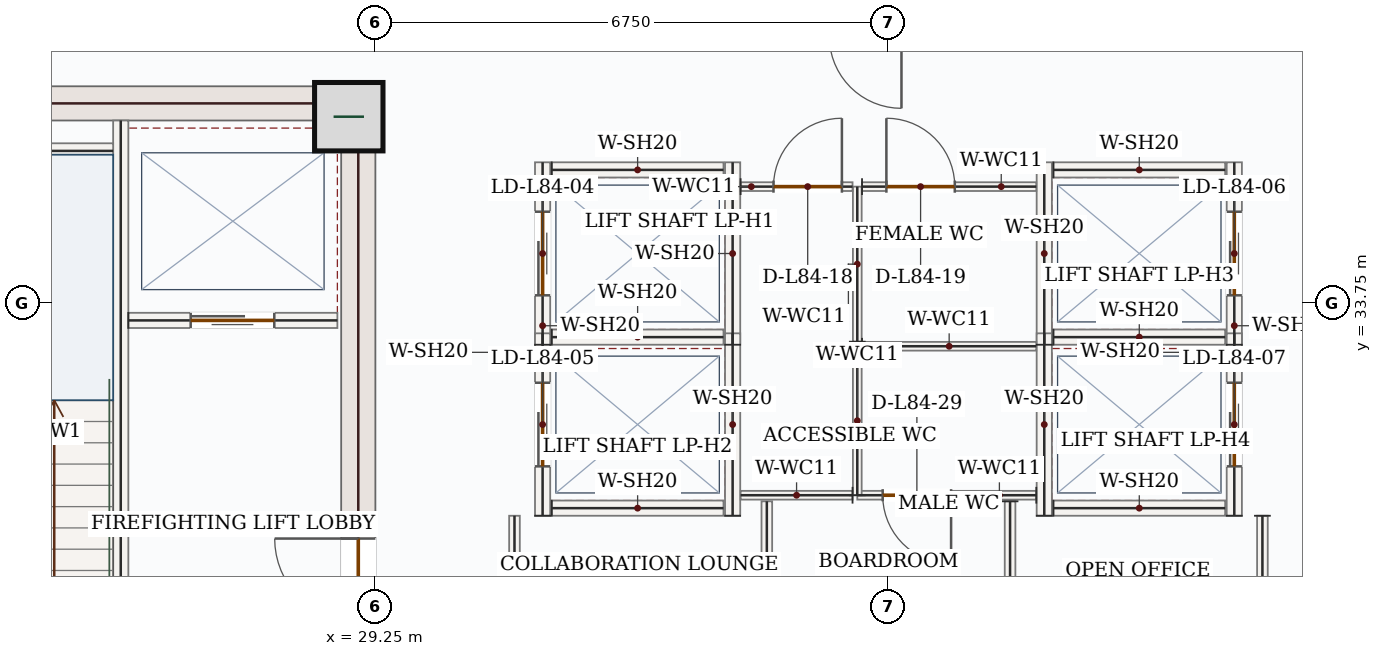
"""IFC4 building model, lengths in metres.
Left out: names, types, materials, properties, quantities, classifications, styles, units other than length and angle.
Written with IfcOpenShell. Run it as: python <this file> out.ifc"""

import sys

from ifc_helpers import new_model, si_unit, direction, frame, frame_2d, origin, origin_2d, place, context, subcontext, project, spatial, rectangle, extrude, source, transform, mapped, element, fill, save


model = new_model("IFC4")
c1 = context("Model", 3, precision=1e-05, world=origin(), true_north=direction((0.0, 1.0)))
c2 = subcontext(c1, "Body", "Model", "MODEL_VIEW")
j1 = project(units=[si_unit("LENGTHUNIT", "METRE"), si_unit("PLANEANGLEUNIT", "RADIAN")], contexts=[c1])
p1 = place(None, origin())
s1 = spatial("IfcSite", under=j1, at=p1, CompositionType="ELEMENT")
p2 = place(p1, origin())
s2 = spatial("IfcBuilding", under=s1, at=p2, CompositionType="ELEMENT")
p3 = place(p2, frame((0.0, 0.0, 346.05)))
s3 = spatial("IfcBuildingStorey", under=s2, at=p3, CompositionType="ELEMENT", Elevation=346.05)
p4 = place(p3, frame((29.025, 28.05, 0.0), z_axis=(0.0, 0.0, 1.0), x_axis=(0.0, 1.0, 0.0)))
e1 = element("IfcWall", 1, at=p4, inside=s3, PredefinedType="SHEAR", context=c2, shape_type="SweptSolid", body=[
    extrude(rectangle(XDim=8.55, YDim=0.45, at=frame_2d((4.275, 0.0))), origin(), (0.0, 0.0, 1.0), 3.5),
])
p5 = place(p4, frame((1.5, 0.0, 0.0)))
e2 = element("IfcOpeningElement", 2, at=p5, cuts=e1, PredefinedType="OPENING", context=c2, shape_type="SweptSolid", body=[
    extrude(rectangle(XDim=1.1, YDim=2.2, at=frame_2d((0.55, 1.1))), frame((0.0, 0.235, 0.0), z_axis=(0.0, -1.0, 0.0), x_axis=(1.0, 0.0, 0.0)), (0.0, 0.0, 1.0), 0.47),
])
m1 = source(origin(), c2, "Body", "SweptSolid", [
    extrude(rectangle(XDim=7.1, YDim=0.45, at=frame_2d((3.55, 0.0))), origin(), (0.0, 0.0, 1.0), 3.5),
])
p6 = place(p3, frame((21.7, 36.375, 0.0), z_axis=(0.0, 0.0, 1.0), x_axis=(1.0, 0.0, 0.0)))
e3 = element("IfcWall", 3, at=p6, inside=s3, PredefinedType="SHEAR", context=c2, shape_type="MappedRepresentation", body=[
    mapped(m1, transform((0.0, 0.0, 0.0), x_axis=(1.0, 0.0, 0.0), y_axis=(0.0, 1.0, 0.0), z_axis=(0.0, 0.0, 1.0), scale=1.0)),
])
m2 = source(origin(), c2, "Body", "SweptSolid", [
    extrude(rectangle(XDim=0.9, YDim=0.9, at=origin_2d()), origin(), (0.0, 0.0, 1.0), 3.75),
])
p7 = place(p3, frame((28.9, 36.2, 0.0), z_axis=(0.0, 0.0, 1.0), x_axis=(1.0, 0.0, 0.0)))
e4 = element("IfcColumn", 4, at=p7, inside=s3, PredefinedType="COLUMN", context=c2, shape_type="MappedRepresentation", body=[
    mapped(m2, transform((0.0, 0.0, 0.0), x_axis=(1.0, 0.0, 0.0), y_axis=(0.0, 1.0, 0.0), z_axis=(0.0, 0.0, 1.0), scale=1.0)),
])
p8 = place(p3, frame((25.9, 28.15, 0.0), z_axis=(0.0, 0.0, 1.0), x_axis=(0.0, 1.0, 0.0)))
e5 = element("IfcWall", 5, at=p8, inside=s3, PredefinedType="SOLIDWALL", context=c2, shape_type="SweptSolid", body=[
    extrude(rectangle(XDim=8.0, YDim=0.2, at=frame_2d((4.0, 0.0))), origin(), (0.0, 0.0, 1.0), 3.5),
])
p9 = place(p8, frame((0.4, 0.0, 0.0)))
e6 = element("IfcOpeningElement", 6, at=p9, cuts=e5, PredefinedType="OPENING", context=c2, shape_type="SweptSolid", body=[
    extrude(rectangle(XDim=1.05, YDim=2.15, at=frame_2d((0.525, 1.075))), frame((0.0, 0.11, 0.0), z_axis=(0.0, -1.0, 0.0), x_axis=(1.0, 0.0, 0.0)), (0.0, 0.0, 1.0), 0.22),
])
m3 = source(origin(), c2, "Body", "SweptSolid", [
    extrude(rectangle(XDim=3.25, YDim=0.2, at=frame_2d((1.625, 0.0))), origin(), (0.0, 0.0, 1.0), 3.5),
])
p10 = place(p3, frame((22.55, 35.75, 0.0), z_axis=(0.0, 0.0, 1.0), x_axis=(1.0, 0.0, 0.0)))
e7 = element("IfcWall", 7, at=p10, inside=s3, PredefinedType="SOLIDWALL", context=c2, shape_type="MappedRepresentation", body=[
    mapped(m3, transform((0.0, 0.0, 0.0), x_axis=(1.0, 0.0, 0.0), y_axis=(0.0, 1.0, 0.0), z_axis=(0.0, 0.0, 1.0), scale=1.0)),
])
p11 = place(p3, frame((26.0, 33.52, 0.0), z_axis=(0.0, 0.0, 1.0), x_axis=(1.0, 0.0, 0.0)))
e8 = element("IfcWall", 8, at=p11, inside=s3, PredefinedType="SOLIDWALL", context=c2, shape_type="SweptSolid", body=[
    extrude(rectangle(XDim=2.75, YDim=0.2, at=frame_2d((1.375, 0.0))), origin(), (0.0, 0.0, 1.0), 3.5),
])
p12 = place(p11, frame((0.82, 0.0, 0.0)))
e9 = element("IfcOpeningElement", 9, at=p12, cuts=e8, PredefinedType="OPENING", context=c2, shape_type="SweptSolid", body=[
    extrude(rectangle(XDim=1.1, YDim=2.15, at=frame_2d((0.55, 1.075))), frame((0.0, 0.11, 0.0), z_axis=(0.0, -1.0, 0.0), x_axis=(1.0, 0.0, 0.0)), (0.0, 0.0, 1.0), 0.22),
])
p13 = place(p3, frame((31.45, 33.2, 0.0), z_axis=(0.0, 0.0, 1.0), x_axis=(0.0, 1.0, 0.0)))
e10 = element("IfcWall", 10, at=p13, inside=s3, PredefinedType="SOLIDWALL", context=c2, shape_type="SweptSolid", body=[
    extrude(rectangle(XDim=2.4, YDim=0.2, at=frame_2d((1.2, 0.0))), origin(), (0.0, 0.0, 1.0), 3.5),
])
p14 = place(p13, frame((0.65, 0.0, 0.0)))
e11 = element("IfcOpeningElement", 11, at=p14, cuts=e10, PredefinedType="OPENING", context=c2, shape_type="SweptSolid", body=[
    extrude(rectangle(XDim=1.1, YDim=2.15, at=frame_2d((0.55, 1.075))), frame((0.0, 0.11, 0.0), z_axis=(0.0, -1.0, 0.0), x_axis=(1.0, 0.0, 0.0)), (0.0, 0.0, 1.0), 0.22),
])
m4 = source(origin(), c2, "Body", "SweptSolid", [
    extrude(rectangle(XDim=2.4, YDim=0.2, at=frame_2d((1.2, 0.0))), origin(), (0.0, 0.0, 1.0), 3.5),
])
p15 = place(p3, frame((33.95, 33.2, 0.0), z_axis=(0.0, 0.0, 1.0), x_axis=(0.0, 1.0, 0.0)))
e12 = element("IfcWall", 12, at=p15, inside=s3, PredefinedType="SOLIDWALL", context=c2, shape_type="MappedRepresentation", body=[
    mapped(m4, transform((0.0, 0.0, 0.0), x_axis=(1.0, 0.0, 0.0), y_axis=(0.0, 1.0, 0.0), z_axis=(0.0, 0.0, 1.0), scale=1.0)),
])
m5 = source(origin(), c2, "Body", "SweptSolid", [
    extrude(rectangle(XDim=2.26, YDim=0.2, at=frame_2d((1.13, 0.0))), origin(), (0.0, 0.0, 1.0), 3.5),
])
for number, where, z_axis, x_axis in (
    (13, (31.57, 33.3, 0.0), (0.0, 0.0, 1.0), (1.0, 0.0, 0.0)),
    (14, (31.57, 35.5, 0.0), (0.0, 0.0, 1.0), (1.0, 0.0, 0.0)),
):
    element("IfcWall", number, at=place(p3, frame(where, z_axis=z_axis, x_axis=x_axis)), inside=s3, PredefinedType="SOLIDWALL", context=c2, shape_type="MappedRepresentation", body=[
        mapped(m5, transform((0.0, 0.0, 0.0), x_axis=(1.0, 0.0, 0.0), y_axis=(0.0, 1.0, 0.0), z_axis=(0.0, 0.0, 1.0), scale=1.0)),
    ])
p16 = place(p3, frame((31.45, 30.95, 0.0), z_axis=(0.0, 0.0, 1.0), x_axis=(0.0, 1.0, 0.0)))
e15 = element("IfcWall", 15, at=p16, inside=s3, PredefinedType="SOLIDWALL", context=c2, shape_type="SweptSolid", body=[
    extrude(rectangle(XDim=2.4, YDim=0.2, at=frame_2d((1.2, 0.0))), origin(), (0.0, 0.0, 1.0), 3.5),
])
p17 = place(p16, frame((0.65, 0.0, 0.0)))
e16 = element("IfcOpeningElement", 16, at=p17, cuts=e15, PredefinedType="OPENING", context=c2, shape_type="SweptSolid", body=[
    extrude(rectangle(XDim=1.1, YDim=2.15, at=frame_2d((0.55, 1.075))), frame((0.0, 0.11, 0.0), z_axis=(0.0, -1.0, 0.0), x_axis=(1.0, 0.0, 0.0)), (0.0, 0.0, 1.0), 0.22),
])
p18 = place(p3, frame((33.95, 30.95, 0.0), z_axis=(0.0, 0.0, 1.0), x_axis=(0.0, 1.0, 0.0)))
e17 = element("IfcWall", 17, at=p18, inside=s3, PredefinedType="SOLIDWALL", context=c2, shape_type="MappedRepresentation", body=[
    mapped(m4, transform((0.0, 0.0, 0.0), x_axis=(1.0, 0.0, 0.0), y_axis=(0.0, 1.0, 0.0), z_axis=(0.0, 0.0, 1.0), scale=1.0)),
])
p19 = place(p3, frame((31.57, 31.05, 0.0), z_axis=(0.0, 0.0, 1.0), x_axis=(1.0, 0.0, 0.0)))
e18 = element("IfcWall", 18, at=p19, inside=s3, PredefinedType="SOLIDWALL", context=c2, shape_type="MappedRepresentation", body=[
    mapped(m5, transform((0.0, 0.0, 0.0), x_axis=(1.0, 0.0, 0.0), y_axis=(0.0, 1.0, 0.0), z_axis=(0.0, 0.0, 1.0), scale=1.0)),
])
p20 = place(p3, frame((38.05, 33.2, 0.0), z_axis=(0.0, 0.0, 1.0), x_axis=(0.0, 1.0, 0.0)))
e19 = element("IfcWall", 19, at=p20, inside=s3, PredefinedType="SOLIDWALL", context=c2, shape_type="MappedRepresentation", body=[
    mapped(m4, transform((0.0, 0.0, 0.0), x_axis=(1.0, 0.0, 0.0), y_axis=(0.0, 1.0, 0.0), z_axis=(0.0, 0.0, 1.0), scale=1.0)),
])
p21 = place(p3, frame((40.55, 33.2, 0.0), z_axis=(0.0, 0.0, 1.0), x_axis=(0.0, 1.0, 0.0)))
e20 = element("IfcWall", 20, at=p21, inside=s3, PredefinedType="SOLIDWALL", context=c2, shape_type="SweptSolid", body=[
    extrude(rectangle(XDim=2.4, YDim=0.2, at=frame_2d((1.2, 0.0))), origin(), (0.0, 0.0, 1.0), 3.5),
])
p22 = place(p21, frame((0.65, 0.0, 0.0)))
e21 = element("IfcOpeningElement", 21, at=p22, cuts=e20, PredefinedType="OPENING", context=c2, shape_type="SweptSolid", body=[
    extrude(rectangle(XDim=1.1, YDim=2.15, at=frame_2d((0.55, 1.075))), frame((0.0, 0.11, 0.0), z_axis=(0.0, -1.0, 0.0), x_axis=(1.0, 0.0, 0.0)), (0.0, 0.0, 1.0), 0.22),
])
for number, where, z_axis, x_axis in (
    (22, (38.17, 33.3, 0.0), (0.0, 0.0, 1.0), (1.0, 0.0, 0.0)),
    (23, (38.17, 35.5, 0.0), (0.0, 0.0, 1.0), (1.0, 0.0, 0.0)),
):
    element("IfcWall", number, at=place(p3, frame(where, z_axis=z_axis, x_axis=x_axis)), inside=s3, PredefinedType="SOLIDWALL", context=c2, shape_type="MappedRepresentation", body=[
        mapped(m5, transform((0.0, 0.0, 0.0), x_axis=(1.0, 0.0, 0.0), y_axis=(0.0, 1.0, 0.0), z_axis=(0.0, 0.0, 1.0), scale=1.0)),
    ])
p23 = place(p3, frame((38.05, 30.95, 0.0), z_axis=(0.0, 0.0, 1.0), x_axis=(0.0, 1.0, 0.0)))
e24 = element("IfcWall", 24, at=p23, inside=s3, PredefinedType="SOLIDWALL", context=c2, shape_type="MappedRepresentation", body=[
    mapped(m4, transform((0.0, 0.0, 0.0), x_axis=(1.0, 0.0, 0.0), y_axis=(0.0, 1.0, 0.0), z_axis=(0.0, 0.0, 1.0), scale=1.0)),
])
p24 = place(p3, frame((40.55, 30.95, 0.0), z_axis=(0.0, 0.0, 1.0), x_axis=(0.0, 1.0, 0.0)))
e25 = element("IfcWall", 25, at=p24, inside=s3, PredefinedType="SOLIDWALL", context=c2, shape_type="SweptSolid", body=[
    extrude(rectangle(XDim=2.4, YDim=0.2, at=frame_2d((1.2, 0.0))), origin(), (0.0, 0.0, 1.0), 3.5),
])
p25 = place(p24, frame((0.65, 0.0, 0.0)))
e26 = element("IfcOpeningElement", 26, at=p25, cuts=e25, PredefinedType="OPENING", context=c2, shape_type="SweptSolid", body=[
    extrude(rectangle(XDim=1.1, YDim=2.15, at=frame_2d((0.55, 1.075))), frame((0.0, 0.11, 0.0), z_axis=(0.0, -1.0, 0.0), x_axis=(1.0, 0.0, 0.0)), (0.0, 0.0, 1.0), 0.22),
])
p26 = place(p3, frame((38.17, 31.05, 0.0), z_axis=(0.0, 0.0, 1.0), x_axis=(1.0, 0.0, 0.0)))
e27 = element("IfcWall", 27, at=p26, inside=s3, PredefinedType="SOLIDWALL", context=c2, shape_type="MappedRepresentation", body=[
    mapped(m5, transform((0.0, 0.0, 0.0), x_axis=(1.0, 0.0, 0.0), y_axis=(0.0, 1.0, 0.0), z_axis=(0.0, 0.0, 1.0), scale=1.0)),
])
p27 = place(p3, frame((37.945, 31.22, 0.0), z_axis=(0.0, 0.0, 1.0), x_axis=(-1.0, 0.0, 0.0)))
e28 = element("IfcWall", 28, at=p27, inside=s3, PredefinedType="PARTITIONING", context=c2, shape_type="SweptSolid", body=[
    extrude(rectangle(XDim=2.355, YDim=0.115, at=frame_2d((1.177, 0.0))), origin(), (0.0, 0.0, 1.0), 3.5),
])
p28 = place(p27, frame((1.121, 0.0, 0.0)))
e29 = element("IfcOpeningElement", 29, at=p28, cuts=e28, PredefinedType="OPENING", context=c2, shape_type="SweptSolid", body=[
    extrude(rectangle(XDim=0.9, YDim=2.1, at=frame_2d((0.45, 1.05))), frame((0.0, 0.067, 0.0), z_axis=(0.0, -1.0, 0.0), x_axis=(1.0, 0.0, 0.0)), (0.0, 0.0, 1.0), 0.135),
])
m6 = source(origin(), c2, "Body", "SweptSolid", [
    extrude(rectangle(XDim=1.96, YDim=0.115, at=frame_2d((0.98, 0.0))), origin(), (0.0, 0.0, 1.0), 3.5),
])
p29 = place(p3, frame((35.59, 31.22, 0.0), z_axis=(0.0, 0.0, 1.0), x_axis=(0.0, 1.0, 0.0)))
e30 = element("IfcWall", 30, at=p29, inside=s3, PredefinedType="PARTITIONING", context=c2, shape_type="MappedRepresentation", body=[
    mapped(m6, transform((0.0, 0.0, 0.0), x_axis=(1.0, 0.0, 0.0), y_axis=(0.0, 1.0, 0.0), z_axis=(0.0, 0.0, 1.0), scale=1.0)),
])
m7 = source(origin(), c2, "Body", "SweptSolid", [
    extrude(rectangle(XDim=2.292, YDim=0.115, at=frame_2d((1.146, 0.0))), origin(), (0.0, 0.0, 1.0), 3.5),
])
p30 = place(p3, frame((35.653, 33.18, 0.0), z_axis=(0.0, 0.0, 1.0), x_axis=(1.0, 0.0, 0.0)))
e31 = element("IfcWall", 31, at=p30, inside=s3, PredefinedType="PARTITIONING", context=c2, shape_type="MappedRepresentation", body=[
    mapped(m7, transform((0.0, 0.0, 0.0), x_axis=(1.0, 0.0, 0.0), y_axis=(0.0, 1.0, 0.0), z_axis=(0.0, 0.0, 1.0), scale=1.0)),
])
m8 = source(origin(), c2, "Body", "SweptSolid", [
    extrude(rectangle(XDim=2.04, YDim=0.115, at=frame_2d((1.02, 0.0))), origin(), (0.0, 0.0, 1.0), 3.5),
])
p31 = place(p3, frame((35.59, 33.24, 0.0), z_axis=(0.0, 0.0, 1.0), x_axis=(0.0, 1.0, 0.0)))
e32 = element("IfcWall", 32, at=p31, inside=s3, PredefinedType="PARTITIONING", context=c2, shape_type="MappedRepresentation", body=[
    mapped(m8, transform((0.0, 0.0, 0.0), x_axis=(1.0, 0.0, 0.0), y_axis=(0.0, 1.0, 0.0), z_axis=(0.0, 0.0, 1.0), scale=1.0)),
])
p32 = place(p3, frame((35.653, 35.28, 0.0), z_axis=(0.0, 0.0, 1.0), x_axis=(1.0, 0.0, 0.0)))
e33 = element("IfcWall", 33, at=p32, inside=s3, PredefinedType="PARTITIONING", context=c2, shape_type="SweptSolid", body=[
    extrude(rectangle(XDim=2.292, YDim=0.115, at=frame_2d((1.146, 0.0))), origin(), (0.0, 0.0, 1.0), 3.5),
])
p33 = place(p32, frame((0.32, 0.0, 0.0)))
e34 = element("IfcOpeningElement", 34, at=p33, cuts=e33, PredefinedType="OPENING", context=c2, shape_type="SweptSolid", body=[
    extrude(rectangle(XDim=0.9, YDim=2.1, at=frame_2d((0.45, 1.05))), frame((0.0, 0.067, 0.0), z_axis=(0.0, -1.0, 0.0), x_axis=(1.0, 0.0, 0.0)), (0.0, 0.0, 1.0), 0.135),
])
m9 = source(origin(), c2, "Body", "SweptSolid", [
    extrude(rectangle(XDim=1.473, YDim=0.115, at=frame_2d((0.736, 0.0))), origin(), (0.0, 0.0, 1.0), 3.5),
])
p34 = place(p3, frame((35.528, 31.22, 0.0), z_axis=(0.0, 0.0, 1.0), x_axis=(-1.0, 0.0, 0.0)))
e35 = element("IfcWall", 35, at=p34, inside=s3, PredefinedType="PARTITIONING", context=c2, shape_type="MappedRepresentation", body=[
    mapped(m9, transform((0.0, 0.0, 0.0), x_axis=(1.0, 0.0, 0.0), y_axis=(0.0, 1.0, 0.0), z_axis=(0.0, 0.0, 1.0), scale=1.0)),
])
p35 = place(p3, frame((34.055, 35.28, 0.0), z_axis=(0.0, 0.0, 1.0), x_axis=(1.0, 0.0, 0.0)))
e36 = element("IfcWall", 36, at=p35, inside=s3, PredefinedType="PARTITIONING", context=c2, shape_type="SweptSolid", body=[
    extrude(rectangle(XDim=1.473, YDim=0.115, at=frame_2d((0.736, 0.0))), origin(), (0.0, 0.0, 1.0), 3.5),
])
p36 = place(p35, frame((0.433, 0.0, 0.0)))
e37 = element("IfcOpeningElement", 37, at=p36, cuts=e36, PredefinedType="OPENING", context=c2, shape_type="SweptSolid", body=[
    extrude(rectangle(XDim=0.9, YDim=2.1, at=frame_2d((0.45, 1.05))), frame((0.0, 0.067, 0.0), z_axis=(0.0, -1.0, 0.0), x_axis=(1.0, 0.0, 0.0)), (0.0, 0.0, 1.0), 0.135),
])
m10 = source(origin(), c2, "Body", "SweptSolid", [
    extrude(rectangle(XDim=3.2, YDim=0.14, at=frame_2d((1.6, 0.0))), origin(), (0.0, 0.0, 1.0), 3.5),
])
for number, where, z_axis, x_axis in (
    (38, (34.4, 27.94, 0.0), (0.0, 0.0, 1.0), (0.0, 1.0, 0.0)),
    (39, (37.6, 31.14, 0.0), (0.0, 0.0, 1.0), (0.0, -1.0, 0.0)),
):
    element("IfcWall", number, at=place(p3, frame(where, z_axis=z_axis, x_axis=x_axis)), inside=s3, PredefinedType="PARTITIONING", context=c2, shape_type="MappedRepresentation", body=[
        mapped(m10, transform((0.0, 0.0, 0.0), x_axis=(1.0, 0.0, 0.0), y_axis=(0.0, 1.0, 0.0), z_axis=(0.0, 0.0, 1.0), scale=1.0)),
    ])
m11 = source(origin(), c2, "Body", "SweptSolid", [
    extrude(rectangle(XDim=2.935, YDim=0.14, at=frame_2d((1.468, 0.0))), origin(), (0.0, 0.0, 1.0), 3.5),
])
p37 = place(p3, frame((31.08, 28.015, 0.0), z_axis=(0.0, 0.0, 1.0), x_axis=(0.0, 1.0, 0.0)))
e40 = element("IfcWall", 40, at=p37, inside=s3, PredefinedType="PARTITIONING", context=c2, shape_type="MappedRepresentation", body=[
    mapped(m11, transform((0.0, 0.0, 0.0), x_axis=(1.0, 0.0, 0.0), y_axis=(0.0, 1.0, 0.0), z_axis=(0.0, 0.0, 1.0), scale=1.0)),
])
m12 = source(origin(), c2, "Body", "SweptSolid", [
    extrude(rectangle(XDim=3.01, YDim=0.14, at=frame_2d((1.505, 0.0))), origin(), (0.0, 0.0, 1.0), 3.5),
])
p38 = place(p3, frame((40.92, 30.95, 0.0), z_axis=(0.0, 0.0, 1.0), x_axis=(0.0, -1.0, 0.0)))
e41 = element("IfcWall", 41, at=p38, inside=s3, PredefinedType="PARTITIONING", context=c2, shape_type="MappedRepresentation", body=[
    mapped(m12, transform((0.0, 0.0, 0.0), x_axis=(1.0, 0.0, 0.0), y_axis=(0.0, 1.0, 0.0), z_axis=(0.0, 0.0, 1.0), scale=1.0)),
])
m13 = source(origin(), c2, "Body", "SweptSolid", [
    extrude(rectangle(XDim=1.1, YDim=2.15, at=frame_2d((0.55, 1.075))), frame((0.0, 0.025, 0.0), z_axis=(0.0, -1.0, 0.0), x_axis=(1.0, 0.0, 0.0)), (0.0, 0.0, 1.0), 0.05),
])
p39 = place(p12, origin())
e42 = element("IfcDoor", 42, at=p39, inside=s3, OperationType="DOUBLE_DOOR_SLIDING", PredefinedType="DOOR", context=c2, shape_type="MappedRepresentation", body=[
    mapped(m13, transform((0.0, 0.0, 0.0), x_axis=(1.0, 0.0, 0.0), y_axis=(0.0, 1.0, 0.0), z_axis=(0.0, 0.0, 1.0), scale=1.0)),
])
fill(e9, e42)
m14 = source(origin(), c2, "Body", "SweptSolid", [
    extrude(rectangle(XDim=1.1, YDim=2.2, at=frame_2d((0.55, 1.1))), frame((0.0, 0.025, 0.0), z_axis=(0.0, -1.0, 0.0), x_axis=(1.0, 0.0, 0.0)), (0.0, 0.0, 1.0), 0.05),
])
p40 = place(p5, origin())
e43 = element("IfcDoor", 43, at=p40, inside=s3, OperationType="SINGLE_SWING_RIGHT", PredefinedType="DOOR", context=c2, shape_type="MappedRepresentation", body=[
    mapped(m14, transform((0.0, 0.0, 0.0), x_axis=(1.0, 0.0, 0.0), y_axis=(0.0, 1.0, 0.0), z_axis=(0.0, 0.0, 1.0), scale=1.0)),
])
fill(e2, e43)
p41 = place(p14, origin())
e44 = element("IfcDoor", 44, at=p41, inside=s3, OperationType="DOUBLE_DOOR_SLIDING", PredefinedType="DOOR", context=c2, shape_type="MappedRepresentation", body=[
    mapped(m13, transform((0.0, 0.0, 0.0), x_axis=(1.0, 0.0, 0.0), y_axis=(0.0, 1.0, 0.0), z_axis=(0.0, 0.0, 1.0), scale=1.0)),
])
fill(e11, e44)
p42 = place(p17, origin())
e45 = element("IfcDoor", 45, at=p42, inside=s3, OperationType="DOUBLE_DOOR_SLIDING", PredefinedType="DOOR", context=c2, shape_type="MappedRepresentation", body=[
    mapped(m13, transform((0.0, 0.0, 0.0), x_axis=(1.0, 0.0, 0.0), y_axis=(0.0, 1.0, 0.0), z_axis=(0.0, 0.0, 1.0), scale=1.0)),
])
fill(e16, e45)
p43 = place(p22, origin())
e46 = element("IfcDoor", 46, at=p43, inside=s3, OperationType="DOUBLE_DOOR_SLIDING", PredefinedType="DOOR", context=c2, shape_type="MappedRepresentation", body=[
    mapped(m13, transform((0.0, 0.0, 0.0), x_axis=(1.0, 0.0, 0.0), y_axis=(0.0, 1.0, 0.0), z_axis=(0.0, 0.0, 1.0), scale=1.0)),
])
fill(e21, e46)
p44 = place(p25, origin())
e47 = element("IfcDoor", 47, at=p44, inside=s3, OperationType="DOUBLE_DOOR_SLIDING", PredefinedType="DOOR", context=c2, shape_type="MappedRepresentation", body=[
    mapped(m13, transform((0.0, 0.0, 0.0), x_axis=(1.0, 0.0, 0.0), y_axis=(0.0, 1.0, 0.0), z_axis=(0.0, 0.0, 1.0), scale=1.0)),
])
fill(e26, e47)
m15 = source(origin(), c2, "Body", "SweptSolid", [
    extrude(rectangle(XDim=0.9, YDim=2.1, at=frame_2d((0.45, 1.05))), frame((0.0, 0.025, 0.0), z_axis=(0.0, -1.0, 0.0), x_axis=(1.0, 0.0, 0.0)), (0.0, 0.0, 1.0), 0.05),
])
p45 = place(p36, origin())
e48 = element("IfcDoor", 48, at=p45, inside=s3, OperationType="SINGLE_SWING_RIGHT", PredefinedType="DOOR", context=c2, shape_type="MappedRepresentation", body=[
    mapped(m15, transform((0.0, 0.0, 0.0), x_axis=(1.0, 0.0, 0.0), y_axis=(0.0, 1.0, 0.0), z_axis=(0.0, 0.0, 1.0), scale=1.0)),
])
fill(e37, e48)
p46 = place(p33, origin())
e49 = element("IfcDoor", 49, at=p46, inside=s3, OperationType="SINGLE_SWING_LEFT", PredefinedType="DOOR", context=c2, shape_type="MappedRepresentation", body=[
    mapped(m15, transform((0.0, 0.0, 0.0), x_axis=(1.0, 0.0, 0.0), y_axis=(0.0, 1.0, 0.0), z_axis=(0.0, 0.0, 1.0), scale=1.0)),
])
fill(e34, e49)
p47 = place(p28, origin())
e50 = element("IfcDoor", 50, at=p47, inside=s3, OperationType="SINGLE_SWING_LEFT", PredefinedType="DOOR", context=c2, shape_type="MappedRepresentation", body=[
    mapped(m15, transform((0.0, 0.0, 0.0), x_axis=(1.0, 0.0, 0.0), y_axis=(0.0, 1.0, 0.0), z_axis=(0.0, 0.0, 1.0), scale=1.0)),
])
fill(e29, e50)
save(model, sys.argv[1])
